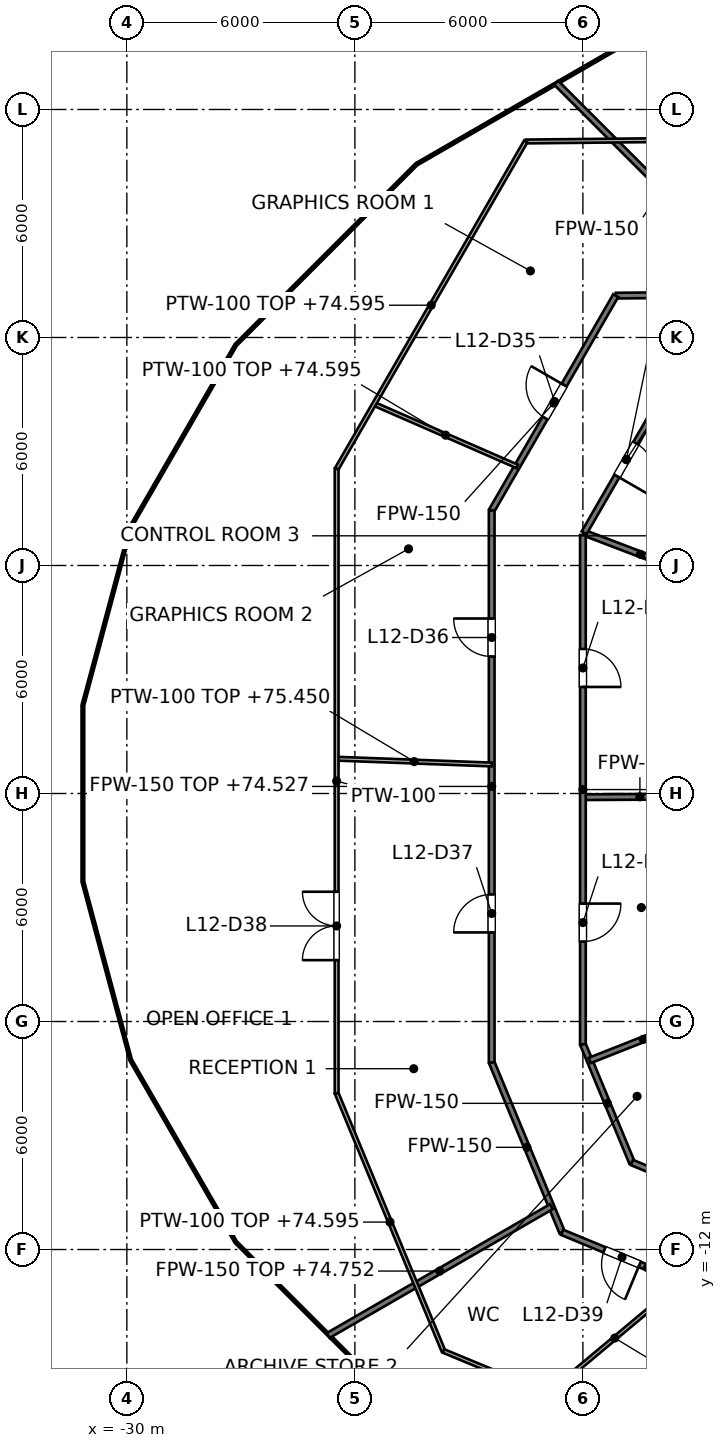
"""IFC4 building model, lengths in metres.
Left out: names, types, materials, properties, quantities, classifications, styles, units other than length and angle.
Written with IfcOpenShell. Run it as: python <this file> out.ifc"""

import sys

from ifc_helpers import new_model, si_unit, direction, frame, frame_2d, origin, place, context, subcontext, project, spatial, rectangle, extrude, element, fill, save


model = new_model("IFC4")
c1 = context("Model", 3, precision=1e-05, world=origin(), true_north=direction((0.0, 1.0)))
c2 = subcontext(c1, "Body", "Model", "MODEL_VIEW")
j1 = project(units=[si_unit("LENGTHUNIT", "METRE"), si_unit("PLANEANGLEUNIT", "RADIAN")], contexts=[c1])
p1 = place(None, origin())
s1 = spatial("IfcSite", under=j1, at=p1, CompositionType="ELEMENT")
p2 = place(p1, origin())
s2 = spatial("IfcBuilding", under=s1, at=p2, CompositionType="ELEMENT")
p3 = place(p2, frame((0.0, 0.0, 71.4)))
s3 = spatial("IfcBuildingStorey", under=s2, at=p3, CompositionType="ELEMENT", Elevation=71.4)
p4 = place(p3, frame((-20.4, -7.075, 0.0), z_axis=(0.0, 0.0, 1.0), x_axis=(0.382745247328, -0.923853925492, 0.0)))
e1 = element("IfcWall", 1, at=p4, inside=s3, PredefinedType="PARTITIONING", context=c2, shape_type="SweptSolid", body=[
    extrude(rectangle(XDim=4.841, YDim=0.15, at=frame_2d((2.42, 0.0))), origin(), (0.0, 0.0, 1.0), 3.195),
])
p5 = place(p3, frame((-18.0, -6.597, 0.0), z_axis=(0.0, 0.0, 1.0), x_axis=(0.382742094492, -0.923855231681, 0.0)))
e2 = element("IfcWall", 2, at=p5, inside=s3, PredefinedType="PARTITIONING", context=c2, shape_type="SweptSolid", body=[
    extrude(rectangle(XDim=3.37, YDim=0.15, at=frame_2d((1.685, 0.0))), origin(), (0.0, 0.0, 1.0), 3.195),
])
p6 = place(p3, frame((-18.703, 18.703, 0.0), z_axis=(0.0, 0.0, 1.0), x_axis=(0.707106781187, -0.707106781187, 0.0)))
e3 = element("IfcWall", 3, at=p6, inside=s3, PredefinedType="PARTITIONING", context=c2, shape_type="SweptSolid", body=[
    extrude(rectangle(XDim=7.865, YDim=0.15, at=frame_2d((3.933, 0.0))), origin(), (0.0, 0.0, 1.0), 3.195),
])
p7 = place(p3, frame((-18.547, -11.547, 0.0), z_axis=(0.0, 0.0, 1.0), x_axis=(0.923816952651, -0.382834478587, 0.0)))
e4 = element("IfcWall", 4, at=p7, inside=s3, PredefinedType="PARTITIONING", context=c2, shape_type="SweptSolid", body=[
    extrude(rectangle(XDim=4.869, YDim=0.15, at=frame_2d((2.435, 0.0))), origin(), (0.0, 0.0, 1.0), 3.195),
])
p8 = place(p7, frame((1.207, 0.0, 0.0)))
e5 = element("IfcOpeningElement", 5, at=p8, cuts=e4, PredefinedType="OPENING", context=c2, shape_type="SweptSolid", body=[
    extrude(rectangle(XDim=1.0, YDim=2.1, at=frame_2d((0.5, 1.05))), frame((0.0, 0.075, 0.0), z_axis=(0.0, -1.0, 0.0), x_axis=(1.0, 0.0, 0.0)), (0.0, 0.0, 1.0), 0.15),
])
p9 = place(p3, frame((-16.71, -9.71, 0.0), z_axis=(0.0, 0.0, 1.0), x_axis=(0.923809320732, -0.382852894632, 0.0)))
e6 = element("IfcWall", 6, at=p9, inside=s3, PredefinedType="PARTITIONING", context=c2, shape_type="SweptSolid", body=[
    extrude(rectangle(XDim=3.385, YDim=0.15, at=frame_2d((1.692, 0.0))), origin(), (0.0, 0.0, 1.0), 3.195),
])
p10 = place(p9, frame((1.139, 0.0, 0.0)))
e7 = element("IfcOpeningElement", 7, at=p10, cuts=e6, PredefinedType="OPENING", context=c2, shape_type="SweptSolid", body=[
    extrude(rectangle(XDim=1.0, YDim=2.1, at=frame_2d((0.5, 1.05))), frame((0.0, 0.075, 0.0), z_axis=(0.0, -1.0, 0.0), x_axis=(1.0, 0.0, 0.0)), (0.0, 0.0, 1.0), 0.15),
])
p11 = place(p3, frame((-17.968, 6.86, 0.0), z_axis=(0.0, 0.0, 1.0), x_axis=(0.934237940374, -0.356650348053, 0.0)))
e8 = element("IfcWall", 8, at=p11, inside=s3, PredefinedType="PARTITIONING", context=c2, shape_type="SweptSolid", body=[
    extrude(rectangle(XDim=3.177, YDim=0.15, at=frame_2d((1.588, 0.0))), origin(), (0.0, 0.0, 1.0), 4.05),
])
p12 = place(p3, frame((-18.0, -0.097, 0.0), z_axis=(0.0, 0.0, 1.0), x_axis=(0.999985575988, 0.005371016277, 0.0)))
e9 = element("IfcWall", 9, at=p12, inside=s3, PredefinedType="PARTITIONING", context=c2, shape_type="SweptSolid", body=[
    extrude(rectangle(XDim=3.0, YDim=0.15, at=frame_2d((1.5, 0.0))), origin(), (0.0, 0.0, 1.0), 3.195),
])
p13 = place(p3, frame((-17.135, 13.101, 0.0), z_axis=(0.0, 0.0, 1.0), x_axis=(0.999950742047, 0.009925395736, 0.0)))
e10 = element("IfcWall", 10, at=p13, inside=s3, PredefinedType="PARTITIONING", context=c2, shape_type="SweptSolid", body=[
    extrude(rectangle(XDim=31.559, YDim=0.15, at=frame_2d((15.779, 0.0))), origin(), (0.0, 0.0, 1.0), 3.127),
])
p14 = place(p13, frame((21.441, 0.0, 0.0)))
e11 = element("IfcOpeningElement", 11, at=p14, cuts=e10, PredefinedType="OPENING", context=c2, shape_type="SweptSolid", body=[
    extrude(rectangle(XDim=1.0, YDim=2.1, at=frame_2d((0.5, 1.05))), frame((0.0, 0.075, 0.0), z_axis=(0.0, -1.0, 0.0), x_axis=(1.0, 0.0, 0.0)), (0.0, 0.0, 1.0), 0.15),
])
p15 = place(p13, frame((8.739, 0.0, 0.0)))
e12 = element("IfcOpeningElement", 12, at=p15, cuts=e10, PredefinedType="OPENING", context=c2, shape_type="SweptSolid", body=[
    extrude(rectangle(XDim=1.0, YDim=2.1, at=frame_2d((0.5, 1.05))), frame((0.0, 0.075, 0.0), z_axis=(0.0, -1.0, 0.0), x_axis=(1.0, 0.0, 0.0)), (0.0, 0.0, 1.0), 0.15),
])
p16 = place(p3, frame((-17.822, -7.026, 0.0), z_axis=(0.0, 0.0, 1.0), x_axis=(0.930286083334, 0.366834844522, 0.0)))
e13 = element("IfcWall", 13, at=p16, inside=s3, PredefinedType="PARTITIONING", context=c2, shape_type="SweptSolid", body=[
    extrude(rectangle(XDim=3.033, YDim=0.15, at=frame_2d((1.517, 0.0))), origin(), (0.0, 0.0, 1.0), 4.05),
])
p17 = place(p3, frame((-24.703, -14.263, 0.0), z_axis=(0.0, 0.0, 1.0), x_axis=(0.866084930914, 0.499896881811, 0.0)))
e14 = element("IfcWall", 14, at=p17, inside=s3, PredefinedType="PARTITIONING", context=c2, shape_type="SweptSolid", body=[
    extrude(rectangle(XDim=6.785, YDim=0.15, at=frame_2d((3.393, 0.0))), origin(), (0.0, 0.0, 1.0), 3.352),
])
p18 = place(p3, frame((-17.968, 6.86, 0.0), z_axis=(0.0, 0.0, 1.0), x_axis=(0.499985160367, 0.866033971281, 0.0)))
e15 = element("IfcWall", 15, at=p18, inside=s3, PredefinedType="PARTITIONING", context=c2, shape_type="SweptSolid", body=[
    extrude(rectangle(XDim=4.451, YDim=0.15, at=frame_2d((2.226, 0.0))), origin(), (0.0, 0.0, 1.0), 3.195),
])
p19 = place(p18, frame((1.724, 0.0, 0.0)))
e16 = element("IfcOpeningElement", 16, at=p19, cuts=e15, PredefinedType="OPENING", context=c2, shape_type="SweptSolid", body=[
    extrude(rectangle(XDim=1.0, YDim=2.1, at=frame_2d((0.5, 1.05))), frame((0.0, 0.075, 0.0), z_axis=(0.0, -1.0, 0.0), x_axis=(1.0, 0.0, 0.0)), (0.0, 0.0, 1.0), 0.15),
])
p20 = place(p3, frame((-20.4, 7.447, 0.0), z_axis=(0.0, 0.0, 1.0), x_axis=(0.499959831567, 0.866048593798, 0.0)))
e17 = element("IfcWall", 17, at=p20, inside=s3, PredefinedType="PARTITIONING", context=c2, shape_type="SweptSolid", body=[
    extrude(rectangle(XDim=6.529, YDim=0.15, at=frame_2d((3.264, 0.0))), origin(), (0.0, 0.0, 1.0), 3.195),
])
p21 = place(p20, frame((2.811, 0.0, 0.0)))
e18 = element("IfcOpeningElement", 18, at=p21, cuts=e17, PredefinedType="OPENING", context=c2, shape_type="SweptSolid", body=[
    extrude(rectangle(XDim=1.0, YDim=2.1, at=frame_2d((0.5, 1.05))), frame((0.0, 0.075, 0.0), z_axis=(0.0, -1.0, 0.0), x_axis=(1.0, 0.0, 0.0)), (0.0, 0.0, 1.0), 0.15),
])
p22 = place(p3, frame((-18.0, -6.597, 0.0), z_axis=(0.0, 0.0, 1.0), x_axis=(0.0, 1.0, 0.0)))
e19 = element("IfcWall", 19, at=p22, inside=s3, PredefinedType="PARTITIONING", context=c2, shape_type="SweptSolid", body=[
    extrude(rectangle(XDim=13.401, YDim=0.15, at=frame_2d((6.7, 0.0))), origin(), (0.0, 0.0, 1.0), 3.127),
])
p23 = place(p22, frame((9.4, 0.0, 0.0)))
e20 = element("IfcOpeningElement", 20, at=p23, cuts=e19, PredefinedType="OPENING", context=c2, shape_type="SweptSolid", body=[
    extrude(rectangle(XDim=1.0, YDim=2.1, at=frame_2d((0.5, 1.05))), frame((0.0, 0.075, 0.0), z_axis=(0.0, -1.0, 0.0), x_axis=(1.0, 0.0, 0.0)), (0.0, 0.0, 1.0), 0.15),
])
p24 = place(p22, frame((2.7, 0.0, 0.0)))
e21 = element("IfcOpeningElement", 21, at=p24, cuts=e19, PredefinedType="OPENING", context=c2, shape_type="SweptSolid", body=[
    extrude(rectangle(XDim=1.0, YDim=2.1, at=frame_2d((0.5, 1.05))), frame((0.0, 0.075, 0.0), z_axis=(0.0, -1.0, 0.0), x_axis=(1.0, 0.0, 0.0)), (0.0, 0.0, 1.0), 0.15),
])
p25 = place(p3, frame((-20.4, -7.075, 0.0), z_axis=(0.0, 0.0, 1.0), x_axis=(0.0, 1.0, 0.0)))
e22 = element("IfcWall", 22, at=p25, inside=s3, PredefinedType="PARTITIONING", context=c2, shape_type="SweptSolid", body=[
    extrude(rectangle(XDim=14.522, YDim=0.15, at=frame_2d((7.261, 0.0))), origin(), (0.0, 0.0, 1.0), 3.127),
])
p26 = place(p25, frame((10.68, 0.0, 0.0)))
e23 = element("IfcOpeningElement", 23, at=p26, cuts=e22, PredefinedType="OPENING", context=c2, shape_type="SweptSolid", body=[
    extrude(rectangle(XDim=1.0, YDim=2.1, at=frame_2d((0.5, 1.05))), frame((0.0, 0.075, 0.0), z_axis=(0.0, -1.0, 0.0), x_axis=(1.0, 0.0, 0.0)), (0.0, 0.0, 1.0), 0.15),
])
p27 = place(p25, frame((3.419, 0.0, 0.0)))
e24 = element("IfcOpeningElement", 24, at=p27, cuts=e22, PredefinedType="OPENING", context=c2, shape_type="SweptSolid", body=[
    extrude(rectangle(XDim=1.0, YDim=2.1, at=frame_2d((0.5, 1.05))), frame((0.0, 0.075, 0.0), z_axis=(0.0, -1.0, 0.0), x_axis=(1.0, 0.0, 0.0)), (0.0, 0.0, 1.0), 0.15),
])
p28 = place(p3, frame((-24.48, -7.887, 0.0), z_axis=(0.0, 0.0, 1.0), x_axis=(0.382715997849, -0.923866042774, 0.0)))
e25 = element("IfcWall", 25, at=p28, inside=s3, PredefinedType="PARTITIONING", context=c2, shape_type="SweptSolid", body=[
    extrude(rectangle(XDim=7.341, YDim=0.1, at=frame_2d((3.67, 0.0))), origin(), (0.0, 0.0, 1.0), 3.195),
])
p29 = place(p3, frame((-23.493, 10.25, 0.0), z_axis=(0.0, 0.0, 1.0), x_axis=(0.916532244419, -0.399960804254, 0.0)))
e26 = element("IfcWall", 26, at=p29, inside=s3, PredefinedType="PARTITIONING", context=c2, shape_type="SweptSolid", body=[
    extrude(rectangle(XDim=4.106, YDim=0.1, at=frame_2d((2.053, 0.0))), origin(), (0.0, 0.0, 1.0), 3.195),
])
p30 = place(p3, frame((-21.67, -14.669, 0.0), z_axis=(0.0, 0.0, 1.0), x_axis=(0.923809076309, -0.382853484415, 0.0)))
e27 = element("IfcWall", 27, at=p30, inside=s3, PredefinedType="PARTITIONING", context=c2, shape_type="SweptSolid", body=[
    extrude(rectangle(XDim=7.392, YDim=0.1, at=frame_2d((3.696, 0.0))), origin(), (0.0, 0.0, 1.0), 3.195),
])
p31 = place(p3, frame((-24.48, 0.916, 0.0), z_axis=(0.0, 0.0, 1.0), x_axis=(0.999296943798, -0.037491573945, 0.0)))
e28 = element("IfcWall", 28, at=p31, inside=s3, PredefinedType="PARTITIONING", context=c2, shape_type="SweptSolid", body=[
    extrude(rectangle(XDim=4.083, YDim=0.1, at=frame_2d((2.042, 0.0))), origin(), (0.0, 0.0, 1.0), 4.05),
])
p32 = place(p3, frame((-19.504, 17.158, 0.0), z_axis=(0.0, 0.0, 1.0), x_axis=(0.999950671051, 0.009932545728, 0.0)))
e29 = element("IfcWall", 29, at=p32, inside=s3, PredefinedType="PARTITIONING", context=c2, shape_type="SweptSolid", body=[
    extrude(rectangle(XDim=35.002, YDim=0.1, at=frame_2d((17.501, 0.0))), origin(), (0.0, 0.0, 1.0), 3.127),
])
p33 = place(p32, frame((26.753, 0.0, 0.0)))
e30 = element("IfcOpeningElement", 30, at=p33, cuts=e29, PredefinedType="OPENING", context=c2, shape_type="SweptSolid", body=[
    extrude(rectangle(XDim=0.9, YDim=2.1, at=frame_2d((0.45, 1.05))), frame((0.0, 0.05, 0.0), z_axis=(0.0, -1.0, 0.0), x_axis=(1.0, 0.0, 0.0)), (0.0, 0.0, 1.0), 0.1),
])
p34 = place(p32, frame((10.463, 0.0, 0.0)))
e31 = element("IfcOpeningElement", 31, at=p34, cuts=e29, PredefinedType="OPENING", context=c2, shape_type="SweptSolid", body=[
    extrude(rectangle(XDim=0.9, YDim=2.1, at=frame_2d((0.45, 1.05))), frame((0.0, 0.05, 0.0), z_axis=(0.0, -1.0, 0.0), x_axis=(1.0, 0.0, 0.0)), (0.0, 0.0, 1.0), 0.1),
])
p35 = place(p3, frame((-18.927, -15.806, 0.0), z_axis=(0.0, 0.0, 1.0), x_axis=(0.767477600109, 0.641075762551, 0.0)))
e32 = element("IfcWall", 32, at=p35, inside=s3, PredefinedType="PARTITIONING", context=c2, shape_type="SweptSolid", body=[
    extrude(rectangle(XDim=4.604, YDim=0.1, at=frame_2d((2.302, 0.0))), origin(), (0.0, 0.0, 1.0), 4.05),
])
p36 = place(p3, frame((-24.48, 8.54, 0.0), z_axis=(0.0, 0.0, 1.0), x_axis=(0.499991453095, 0.866030338286, 0.0)))
e33 = element("IfcWall", 33, at=p36, inside=s3, PredefinedType="PARTITIONING", context=c2, shape_type="SweptSolid", body=[
    extrude(rectangle(XDim=9.951, YDim=0.1, at=frame_2d((4.976, 0.0))), origin(), (0.0, 0.0, 1.0), 3.195),
])
p37 = place(p3, frame((-24.48, -7.887, 0.0), z_axis=(0.0, 0.0, 1.0), x_axis=(0.0, 1.0, 0.0)))
e34 = element("IfcWall", 34, at=p37, inside=s3, PredefinedType="PARTITIONING", context=c2, shape_type="SweptSolid", body=[
    extrude(rectangle(XDim=16.427, YDim=0.1, at=frame_2d((8.213, 0.0))), origin(), (0.0, 0.0, 1.0), 3.127),
])
p38 = place(p37, frame((3.501, 0.0, 0.0)))
e35 = element("IfcOpeningElement", 35, at=p38, cuts=e34, PredefinedType="OPENING", context=c2, shape_type="SweptSolid", body=[
    extrude(rectangle(XDim=1.8, YDim=2.1, at=frame_2d((0.9, 1.05))), frame((0.0, 0.05, 0.0), z_axis=(0.0, -1.0, 0.0), x_axis=(1.0, 0.0, 0.0)), (0.0, 0.0, 1.0), 0.1),
])
p39 = place(p19, origin())
e36 = element("IfcDoor", 36, at=p39, inside=s3, OperationType="SINGLE_SWING_LEFT", PredefinedType="DOOR", context=c2, shape_type="SweptSolid", body=[
    extrude(rectangle(XDim=1.0, YDim=2.1, at=frame_2d((0.5, 1.05))), frame((0.0, 0.025, 0.0), z_axis=(0.0, -1.0, 0.0), x_axis=(1.0, 0.0, 0.0)), (0.0, 0.0, 1.0), 0.05),
])
fill(e16, e36)
p40 = place(p23, origin())
e37 = element("IfcDoor", 37, at=p40, inside=s3, OperationType="SINGLE_SWING_LEFT", PredefinedType="DOOR", context=c2, shape_type="SweptSolid", body=[
    extrude(rectangle(XDim=1.0, YDim=2.1, at=frame_2d((0.5, 1.05))), frame((0.0, 0.025, 0.0), z_axis=(0.0, -1.0, 0.0), x_axis=(1.0, 0.0, 0.0)), (0.0, 0.0, 1.0), 0.05),
])
fill(e20, e37)
p41 = place(p24, origin())
e38 = element("IfcDoor", 38, at=p41, inside=s3, OperationType="SINGLE_SWING_RIGHT", PredefinedType="DOOR", context=c2, shape_type="SweptSolid", body=[
    extrude(rectangle(XDim=1.0, YDim=2.1, at=frame_2d((0.5, 1.05))), frame((0.0, 0.025, 0.0), z_axis=(0.0, -1.0, 0.0), x_axis=(1.0, 0.0, 0.0)), (0.0, 0.0, 1.0), 0.05),
])
fill(e21, e38)
p42 = place(p21, origin())
e39 = element("IfcDoor", 39, at=p42, inside=s3, OperationType="SINGLE_SWING_RIGHT", PredefinedType="DOOR", context=c2, shape_type="SweptSolid", body=[
    extrude(rectangle(XDim=1.0, YDim=2.1, at=frame_2d((0.5, 1.05))), frame((0.0, 0.025, 0.0), z_axis=(0.0, -1.0, 0.0), x_axis=(1.0, 0.0, 0.0)), (0.0, 0.0, 1.0), 0.05),
])
fill(e18, e39)
p43 = place(p26, origin())
e40 = element("IfcDoor", 40, at=p43, inside=s3, OperationType="SINGLE_SWING_RIGHT", PredefinedType="DOOR", context=c2, shape_type="SweptSolid", body=[
    extrude(rectangle(XDim=1.0, YDim=2.1, at=frame_2d((0.5, 1.05))), frame((0.0, 0.025, 0.0), z_axis=(0.0, -1.0, 0.0), x_axis=(1.0, 0.0, 0.0)), (0.0, 0.0, 1.0), 0.05),
])
fill(e23, e40)
p44 = place(p27, origin())
e41 = element("IfcDoor", 41, at=p44, inside=s3, OperationType="SINGLE_SWING_LEFT", PredefinedType="DOOR", context=c2, shape_type="SweptSolid", body=[
    extrude(rectangle(XDim=1.0, YDim=2.1, at=frame_2d((0.5, 1.05))), frame((0.0, 0.025, 0.0), z_axis=(0.0, -1.0, 0.0), x_axis=(1.0, 0.0, 0.0)), (0.0, 0.0, 1.0), 0.05),
])
fill(e24, e41)
p45 = place(p38, origin())
e42 = element("IfcDoor", 42, at=p45, inside=s3, OperationType="DOUBLE_DOOR_SINGLE_SWING", PredefinedType="DOOR", context=c2, shape_type="SweptSolid", body=[
    extrude(rectangle(XDim=1.8, YDim=2.1, at=frame_2d((0.9, 1.05))), frame((0.0, 0.025, 0.0), z_axis=(0.0, -1.0, 0.0), x_axis=(1.0, 0.0, 0.0)), (0.0, 0.0, 1.0), 0.05),
])
fill(e35, e42)
p46 = place(p8, origin())
e43 = element("IfcDoor", 43, at=p46, inside=s3, OperationType="SINGLE_SWING_RIGHT", PredefinedType="DOOR", context=c2, shape_type="SweptSolid", body=[
    extrude(rectangle(XDim=1.0, YDim=2.1, at=frame_2d((0.5, 1.05))), frame((0.0, 0.025, 0.0), z_axis=(0.0, -1.0, 0.0), x_axis=(1.0, 0.0, 0.0)), (0.0, 0.0, 1.0), 0.05),
])
fill(e5, e43)
save(model, sys.argv[1])
